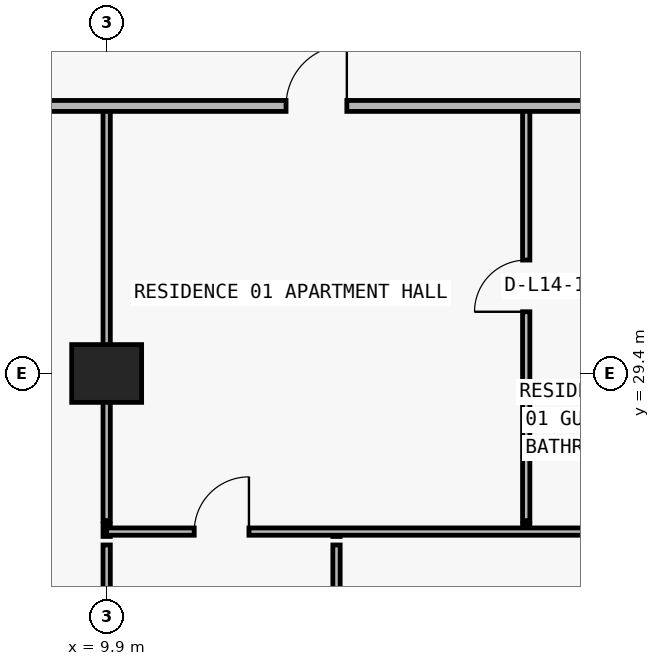
"""IFC4 building model, lengths in metres.
Left out: names, types, materials, properties, quantities, classifications, styles, units other than length and angle.
Written with IfcOpenShell. Run it as: python <this file> out.ifc"""

import sys

from ifc_helpers import new_model, si_unit, direction, frame, frame_2d, origin, origin_2d, place, context, subcontext, project, spatial, rectangle, extrude, element, fill, save


model = new_model("IFC4")
c1 = context("Model", 3, precision=1e-05, world=origin(), true_north=direction((0.0, 1.0)))
c2 = subcontext(c1, "Body", "Model", "MODEL_VIEW")
j1 = project(units=[si_unit("LENGTHUNIT", "METRE"), si_unit("PLANEANGLEUNIT", "RADIAN")], contexts=[c1])
p1 = place(None, origin())
s1 = spatial("IfcSite", under=j1, at=p1, CompositionType="ELEMENT")
p2 = place(p1, origin())
s2 = spatial("IfcBuilding", under=s1, at=p2, CompositionType="ELEMENT")
p3 = place(p2, frame((0.0, 0.0, 56.4)))
s3 = spatial("IfcBuildingStorey", under=s2, at=p3, CompositionType="ELEMENT", Elevation=56.4)
p4 = place(p3, frame((9.9, 29.4, 0.0), z_axis=(0.0, 0.0, 1.0), x_axis=(1.0, 0.0, 0.0)))
e1 = element("IfcColumn", 1, at=p4, inside=s3, PredefinedType="COLUMN", context=c2, shape_type="SweptSolid", body=[
    extrude(rectangle(XDim=1.15, YDim=0.95, at=origin_2d()), origin(), (0.0, 0.0, 1.0), 3.05),
])
p5 = place(p3, frame((9.9, 22.2, 0.0), z_axis=(0.0, 0.0, 1.0), x_axis=(0.0, 1.0, 0.0)))
e2 = element("IfcWall", 2, at=p5, inside=s3, PredefinedType="PARTITIONING", context=c2, shape_type="SweptSolid", body=[
    extrude(rectangle(XDim=4.38, YDim=0.12, at=frame_2d((2.19, 0.0))), origin(), (0.0, 0.0, 1.0), 2.11),
])
p6 = place(p5, frame((1.74, 0.0, 0.0)))
e3 = element("IfcOpeningElement", 3, at=p6, cuts=e2, PredefinedType="OPENING", context=c2, shape_type="SweptSolid", body=[
    extrude(rectangle(XDim=0.9, YDim=2.06, at=frame_2d((0.45, 1.03))), frame((0.0, 0.07, 0.0), z_axis=(0.0, -1.0, 0.0), x_axis=(1.0, 0.0, 0.0)), (0.0, 0.0, 1.0), 0.14),
])
p7 = place(p3, frame((9.9, 26.72, 0.0), z_axis=(0.0, 0.0, 1.0), x_axis=(0.0, 1.0, 0.0)))
e4 = element("IfcWall", 4, at=p7, inside=s3, PredefinedType="PARTITIONING", context=c2, shape_type="SweptSolid", body=[
    extrude(rectangle(XDim=0.2, YDim=0.12, at=frame_2d((0.1, 0.0))), origin(), (0.0, 0.0, 1.0), 2.11),
])
p8 = place(p3, frame((9.9, 26.98, 0.0), z_axis=(0.0, 0.0, 1.0), x_axis=(0.0, 1.0, 0.0)))
e5 = element("IfcWall", 5, at=p8, inside=s3, PredefinedType="PARTITIONING", context=c2, shape_type="SweptSolid", body=[
    extrude(rectangle(XDim=6.82, YDim=0.12, at=frame_2d((3.41, 0.0))), origin(), (0.0, 0.0, 1.0), 2.11),
])
p9 = place(p3, frame((13.68, 22.2, 0.0), z_axis=(0.0, 0.0, 1.0), x_axis=(0.0, 1.0, 0.0)))
e6 = element("IfcWall", 6, at=p9, inside=s3, PredefinedType="PARTITIONING", context=c2, shape_type="SweptSolid", body=[
    extrude(rectangle(XDim=4.38, YDim=0.12, at=frame_2d((2.19, 0.0))), origin(), (0.0, 0.0, 1.0), 3.05),
])
p10 = place(p9, frame((1.74, 0.0, 0.0)))
e7 = element("IfcOpeningElement", 7, at=p10, cuts=e6, PredefinedType="OPENING", context=c2, shape_type="SweptSolid", body=[
    extrude(rectangle(XDim=0.9, YDim=2.15, at=frame_2d((0.45, 1.075))), frame((0.0, 0.07, 0.0), z_axis=(0.0, -1.0, 0.0), x_axis=(1.0, 0.0, 0.0)), (0.0, 0.0, 1.0), 0.14),
])
p11 = place(p3, frame((13.68, 26.72, 0.0), z_axis=(0.0, 0.0, 1.0), x_axis=(0.0, 1.0, 0.0)))
e8 = element("IfcWall", 8, at=p11, inside=s3, PredefinedType="PARTITIONING", context=c2, shape_type="SweptSolid", body=[
    extrude(rectangle(XDim=0.08, YDim=0.12, at=frame_2d((0.04, 0.0))), origin(), (0.0, 0.0, 1.0), 3.05),
])
p12 = place(p3, frame((16.8, 26.8, 0.0), z_axis=(0.0, 0.0, 1.0), x_axis=(0.0, 1.0, 0.0)))
e9 = element("IfcWall", 9, at=p12, inside=s3, PredefinedType="PARTITIONING", context=c2, shape_type="SweptSolid", body=[
    extrude(rectangle(XDim=0.12, YDim=0.12, at=frame_2d((0.06, 0.0))), origin(), (0.0, 0.0, 1.0), 3.05),
])
p13 = place(p3, frame((16.8, 26.98, 0.0), z_axis=(0.0, 0.0, 1.0), x_axis=(0.0, 1.0, 0.0)))
e10 = element("IfcWall", 10, at=p13, inside=s3, PredefinedType="PARTITIONING", context=c2, shape_type="SweptSolid", body=[
    extrude(rectangle(XDim=6.82, YDim=0.12, at=frame_2d((3.41, 0.0))), origin(), (0.0, 0.0, 1.0), 3.05),
])
p14 = place(p13, frame((3.435, 0.0, 0.0)))
e11 = element("IfcOpeningElement", 11, at=p14, cuts=e10, PredefinedType="OPENING", context=c2, shape_type="SweptSolid", body=[
    extrude(rectangle(XDim=0.85, YDim=2.1, at=frame_2d((0.425, 1.05))), frame((0.0, 0.07, 0.0), z_axis=(0.0, -1.0, 0.0), x_axis=(1.0, 0.0, 0.0)), (0.0, 0.0, 1.0), 0.14),
])
p15 = place(p3, frame((9.9, 26.8, 0.0), z_axis=(0.0, 0.0, 1.0), x_axis=(1.0, 0.0, 0.0)))
e12 = element("IfcWall", 12, at=p15, inside=s3, PredefinedType="PARTITIONING", context=c2, shape_type="SweptSolid", body=[
    extrude(rectangle(XDim=8.395, YDim=0.12, at=frame_2d((4.198, 0.0))), origin(), (0.0, 0.0, 1.0), 3.05),
])
p16 = place(p15, frame((1.44, 0.0, 0.0)))
e13 = element("IfcOpeningElement", 13, at=p16, cuts=e12, PredefinedType="OPENING", context=c2, shape_type="SweptSolid", body=[
    extrude(rectangle(XDim=0.9, YDim=2.15, at=frame_2d((0.45, 1.075))), frame((0.0, 0.07, 0.0), z_axis=(0.0, -1.0, 0.0), x_axis=(1.0, 0.0, 0.0)), (0.0, 0.0, 1.0), 0.14),
])
p17 = place(p3, frame((5.105, 33.8, 0.0), z_axis=(0.0, 0.0, 1.0), x_axis=(1.0, 0.0, 0.0)))
e14 = element("IfcWall", 14, at=p17, inside=s3, PredefinedType="PARTITIONING", context=c2, shape_type="SweptSolid", body=[
    extrude(rectangle(XDim=67.595, YDim=0.18, at=frame_2d((33.797, 0.0))), origin(), (0.0, 0.0, 1.0), 3.05),
])
p18 = place(p17, frame((7.745, 0.0, 0.0)))
e15 = element("IfcOpeningElement", 15, at=p18, cuts=e14, PredefinedType="OPENING", context=c2, shape_type="SweptSolid", body=[
    extrude(rectangle(XDim=1.0, YDim=2.2, at=frame_2d((0.5, 1.1))), frame((0.0, 0.1, 0.0), z_axis=(0.0, -1.0, 0.0), x_axis=(1.0, 0.0, 0.0)), (0.0, 0.0, 1.0), 0.2),
])
p19 = place(p17, frame((24.545, 0.0, 0.0)))
e16 = element("IfcOpeningElement", 16, at=p19, cuts=e14, PredefinedType="OPENING", context=c2, shape_type="SweptSolid", body=[
    extrude(rectangle(XDim=1.0, YDim=2.2, at=frame_2d((0.5, 1.1))), frame((0.0, 0.1, 0.0), z_axis=(0.0, -1.0, 0.0), x_axis=(1.0, 0.0, 0.0)), (0.0, 0.0, 1.0), 0.2),
])
p20 = place(p17, frame((40.47, 0.0, 0.0)))
e17 = element("IfcOpeningElement", 17, at=p20, cuts=e14, PredefinedType="OPENING", context=c2, shape_type="SweptSolid", body=[
    extrude(rectangle(XDim=1.0, YDim=2.2, at=frame_2d((0.5, 1.1))), frame((0.0, 0.1, 0.0), z_axis=(0.0, -1.0, 0.0), x_axis=(1.0, 0.0, 0.0)), (0.0, 0.0, 1.0), 0.2),
])
p21 = place(p17, frame((48.87, 0.0, 0.0)))
e18 = element("IfcOpeningElement", 18, at=p21, cuts=e14, PredefinedType="OPENING", context=c2, shape_type="SweptSolid", body=[
    extrude(rectangle(XDim=1.0, YDim=2.2, at=frame_2d((0.5, 1.1))), frame((0.0, 0.1, 0.0), z_axis=(0.0, -1.0, 0.0), x_axis=(1.0, 0.0, 0.0)), (0.0, 0.0, 1.0), 0.2),
])
p22 = place(p17, frame((57.27, 0.0, 0.0)))
e19 = element("IfcOpeningElement", 19, at=p22, cuts=e14, PredefinedType="OPENING", context=c2, shape_type="SweptSolid", body=[
    extrude(rectangle(XDim=1.0, YDim=2.2, at=frame_2d((0.5, 1.1))), frame((0.0, 0.1, 0.0), z_axis=(0.0, -1.0, 0.0), x_axis=(1.0, 0.0, 0.0)), (0.0, 0.0, 1.0), 0.2),
])
p23 = place(p18, origin())
e20 = element("IfcDoor", 20, at=p23, inside=s3, OperationType="SINGLE_SWING_RIGHT", PredefinedType="DOOR", context=c2, shape_type="SweptSolid", body=[
    extrude(rectangle(XDim=1.0, YDim=2.2, at=frame_2d((0.5, 1.1))), frame((0.0, 0.025, 0.0), z_axis=(0.0, -1.0, 0.0), x_axis=(1.0, 0.0, 0.0)), (0.0, 0.0, 1.0), 0.05),
])
fill(e15, e20)
p24 = place(p14, origin())
e21 = element("IfcDoor", 21, at=p24, inside=s3, OperationType="SINGLE_SWING_LEFT", PredefinedType="DOOR", context=c2, shape_type="SweptSolid", body=[
    extrude(rectangle(XDim=0.85, YDim=2.1, at=frame_2d((0.425, 1.05))), frame((0.0, 0.025, 0.0), z_axis=(0.0, -1.0, 0.0), x_axis=(1.0, 0.0, 0.0)), (0.0, 0.0, 1.0), 0.05),
])
fill(e11, e21)
p25 = place(p16, origin())
e22 = element("IfcDoor", 22, at=p25, inside=s3, OperationType="SINGLE_SWING_RIGHT", PredefinedType="DOOR", context=c2, shape_type="SweptSolid", body=[
    extrude(rectangle(XDim=0.9, YDim=2.15, at=frame_2d((0.45, 1.075))), frame((0.0, 0.025, 0.0), z_axis=(0.0, -1.0, 0.0), x_axis=(1.0, 0.0, 0.0)), (0.0, 0.0, 1.0), 0.05),
])
fill(e13, e22)
save(model, sys.argv[1])
